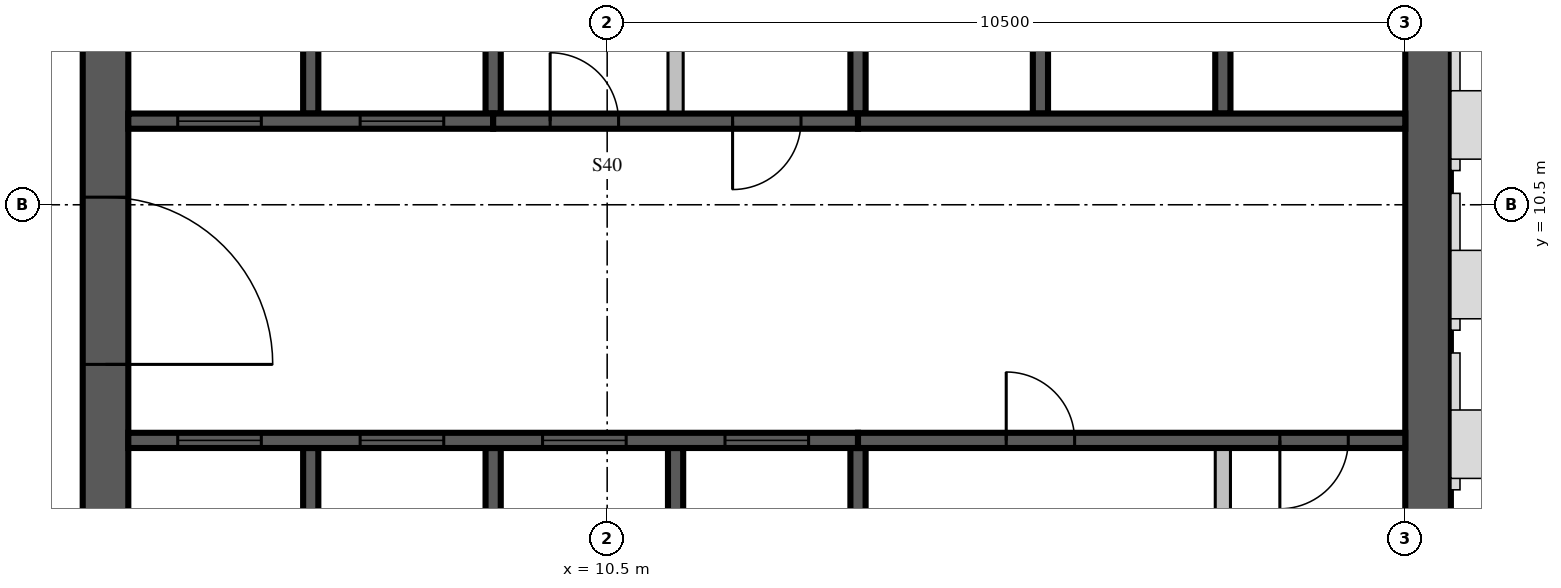
"""IFC4 building model, lengths in metres.
Left out: names, types, materials, properties, quantities, classifications, styles, units other than length and angle.
Written with IfcOpenShell. Run it as: python <this file> out.ifc"""

import sys

from ifc_helpers import new_model, si_unit, direction, frame, frame_2d, origin, place, context, subcontext, project, spatial, rectangle, extrude, source, transform, mapped, element, fill, save


model = new_model("IFC4")
c1 = context("Model", 3, precision=1e-05, world=origin(), true_north=direction((0.0, 1.0)))
c2 = subcontext(c1, "Body", "Model", "MODEL_VIEW")
j1 = project(units=[si_unit("LENGTHUNIT", "METRE"), si_unit("PLANEANGLEUNIT", "RADIAN")], contexts=[c1])
p1 = place(None, origin())
s1 = spatial("IfcSite", under=j1, at=p1, CompositionType="ELEMENT")
p2 = place(p1, origin())
s2 = spatial("IfcBuilding", under=s1, at=p2, CompositionType="ELEMENT")
p3 = place(p2, frame((0.0, 0.0, 337.0)))
s3 = spatial("IfcBuildingStorey", under=s2, at=p3, CompositionType="ELEMENT", Elevation=337.0)
m1 = source(origin(), c2, "Body", "SweptSolid", [
    extrude(rectangle(XDim=17.4, YDim=0.6, at=frame_2d((8.7, 0.0))), origin(), (0.0, 0.0, 1.0), 3.5),
])
p4 = place(p3, frame((3.9, 4.2, 0.0), z_axis=(0.0, 0.0, 1.0), x_axis=(0.0, 1.0, 0.0)))
e1 = element("IfcWall", 1, at=p4, inside=s3, PredefinedType="SHEAR", context=c2, shape_type="MappedRepresentation", body=[
    mapped(m1, transform((0.0, 0.0, 0.0), scale=1.0)),
])
m2 = source(origin(), c2, "Body", "SweptSolid", [
    extrude(rectangle(XDim=2.2, YDim=2.1, at=frame_2d((1.1, 1.05))), frame((0.0, 0.31, 0.0), z_axis=(0.0, -1.0, 0.0), x_axis=(1.0, 0.0, 0.0)), (0.0, 0.0, 1.0), 0.62),
])
p5 = place(p4, frame((4.2, 0.0, 0.0)))
e2 = element("IfcOpeningElement", 2, at=p5, cuts=e1, PredefinedType="OPENING", context=c2, shape_type="MappedRepresentation", body=[
    mapped(m2, transform((0.0, 0.0, 0.0), scale=1.0)),
])
m3 = source(origin(), c2, "Body", "SweptSolid", [
    extrude(rectangle(XDim=16.8, YDim=0.6, at=frame_2d((8.4, 0.0))), origin(), (0.0, 0.0, 1.0), 3.5),
])
p6 = place(p3, frame((21.3, 4.2, 0.0), z_axis=(0.0, 0.0, 1.0), x_axis=(0.0, 1.0, 0.0)))
e3 = element("IfcWall", 3, at=p6, inside=s3, PredefinedType="SHEAR", context=c2, shape_type="MappedRepresentation", body=[
    mapped(m3, transform((0.0, 0.0, 0.0), scale=1.0)),
])
m4 = source(origin(), c2, "Body", "SweptSolid", [
    extrude(rectangle(XDim=1.2, YDim=2.4, at=frame_2d((0.6, 1.2))), frame((0.0, 0.31, 0.0), z_axis=(0.0, -1.0, 0.0), x_axis=(1.0, 0.0, 0.0)), (0.0, 0.0, 1.0), 0.62),
])
p7 = place(p6, frame((12.0, 0.0, 0.6)))
e4 = element("IfcOpeningElement", 4, at=p7, cuts=e3, PredefinedType="OPENING", context=c2, shape_type="MappedRepresentation", body=[
    mapped(m4, transform((0.0, 0.0, 0.0), scale=1.0)),
])
m5 = source(origin(), c2, "Body", "SweptSolid", [
    extrude(rectangle(XDim=3.1, YDim=0.2, at=frame_2d((1.55, 0.0))), origin(), (0.0, 0.0, 1.0), 3.5),
])
for number, where, z_axis, x_axis in (
    (5, (6.6, 4.2, 0.0), (0.0, 0.0, 1.0), (0.0, 1.0, 0.0)),
    (6, (9.0, 4.2, 0.0), (0.0, 0.0, 1.0), (0.0, 1.0, 0.0)),
    (7, (11.4, 4.2, 0.0), (0.0, 0.0, 1.0), (0.0, 1.0, 0.0)),
):
    element("IfcWall", number, at=place(p3, frame(where, z_axis=z_axis, x_axis=x_axis)), inside=s3, PredefinedType="SOLIDWALL", context=c2, shape_type="MappedRepresentation", body=[
        mapped(m5, transform((0.0, 0.0, 0.0), scale=1.0)),
    ])
m6 = source(origin(), c2, "Body", "SweptSolid", [
    extrude(rectangle(XDim=3.1, YDim=0.2, at=frame_2d((1.55, 0.0))), origin(), (0.0, 0.0, 1.0), 3.1),
])
p8 = place(p3, frame((13.8, 4.2, 0.0), z_axis=(0.0, 0.0, 1.0), x_axis=(0.0, 1.0, 0.0)))
e8 = element("IfcWall", 8, at=p8, inside=s3, PredefinedType="SOLIDWALL", context=c2, shape_type="MappedRepresentation", body=[
    mapped(m6, transform((0.0, 0.0, 0.0), scale=1.0)),
])
m7 = source(origin(), c2, "Body", "SweptSolid", [
    extrude(rectangle(XDim=3.1, YDim=0.2, at=frame_2d((1.55, 0.0))), origin(), (0.0, 0.0, 1.0), 3.1),
])
p9 = place(p3, frame((18.6, 4.2, 0.0), z_axis=(0.0, 0.0, 1.0), x_axis=(0.0, 1.0, 0.0)))
e9 = element("IfcWall", 9, at=p9, inside=s3, PredefinedType="PARTITIONING", context=c2, shape_type="MappedRepresentation", body=[
    mapped(m7, transform((0.0, 0.0, 0.0), scale=1.0)),
])
m8 = source(origin(), c2, "Body", "SweptSolid", [
    extrude(rectangle(XDim=3.0, YDim=0.2, at=frame_2d((1.5, 0.0))), origin(), (0.0, 0.0, 1.0), 3.5),
])
p10 = place(p3, frame((6.6, 11.7, 0.0), z_axis=(0.0, 0.0, 1.0), x_axis=(0.0, 1.0, 0.0)))
e10 = element("IfcWall", 10, at=p10, inside=s3, PredefinedType="SOLIDWALL", context=c2, shape_type="MappedRepresentation", body=[
    mapped(m8, transform((0.0, 0.0, 0.0), scale=1.0)),
])
m9 = source(origin(), c2, "Body", "SweptSolid", [
    extrude(rectangle(XDim=3.0, YDim=0.2, at=frame_2d((1.5, 0.0))), origin(), (0.0, 0.0, 1.0), 3.1),
])
for number, where, z_axis, x_axis in (
    (11, (9.0, 11.7, 0.0), (0.0, 0.0, 1.0), (0.0, 1.0, 0.0)),
    (12, (13.8, 11.7, 0.0), (0.0, 0.0, 1.0), (0.0, 1.0, 0.0)),
):
    element("IfcWall", number, at=place(p3, frame(where, z_axis=z_axis, x_axis=x_axis)), inside=s3, PredefinedType="SOLIDWALL", context=c2, shape_type="MappedRepresentation", body=[
        mapped(m9, transform((0.0, 0.0, 0.0), scale=1.0)),
    ])
for number, where, z_axis, x_axis in (
    (13, (16.2, 11.7, 0.0), (0.0, 0.0, 1.0), (0.0, 1.0, 0.0)),
    (14, (18.6, 11.7, 0.0), (0.0, 0.0, 1.0), (0.0, 1.0, 0.0)),
):
    element("IfcWall", number, at=place(p3, frame(where, z_axis=z_axis, x_axis=x_axis)), inside=s3, PredefinedType="SOLIDWALL", context=c2, shape_type="MappedRepresentation", body=[
        mapped(m8, transform((0.0, 0.0, 0.0), scale=1.0)),
    ])
m10 = source(origin(), c2, "Body", "SweptSolid", [
    extrude(rectangle(XDim=3.0, YDim=0.2, at=frame_2d((1.5, 0.0))), origin(), (0.0, 0.0, 1.0), 3.1),
])
p11 = place(p3, frame((11.4, 11.7, 0.0), z_axis=(0.0, 0.0, 1.0), x_axis=(0.0, 1.0, 0.0)))
e15 = element("IfcWall", 15, at=p11, inside=s3, PredefinedType="PARTITIONING", context=c2, shape_type="MappedRepresentation", body=[
    mapped(m10, transform((0.0, 0.0, 0.0), scale=1.0)),
])
m11 = source(origin(), c2, "Body", "SweptSolid", [
    extrude(rectangle(XDim=9.6, YDim=0.2, at=frame_2d((4.8, 0.0))), origin(), (0.0, 0.0, 1.0), 3.5),
])
p12 = place(p3, frame((4.2, 7.4, 0.0), z_axis=(0.0, 0.0, 1.0), x_axis=(1.0, 0.0, 0.0)))
e16 = element("IfcWall", 16, at=p12, inside=s3, PredefinedType="SOLIDWALL", context=c2, shape_type="MappedRepresentation", body=[
    mapped(m11, transform((0.0, 0.0, 0.0), scale=1.0)),
])
m12 = source(origin(), c2, "Body", "SweptSolid", [
    extrude(rectangle(XDim=1.1, YDim=2.1, at=frame_2d((0.55, 1.05))), frame((0.0, 0.11, 0.0), z_axis=(0.0, -1.0, 0.0), x_axis=(1.0, 0.0, 0.0)), (0.0, 0.0, 1.0), 0.22),
])
p13 = place(p12, frame((0.65, 0.0, 0.0)))
e17 = element("IfcOpeningElement", 17, at=p13, cuts=e16, PredefinedType="OPENING", context=c2, shape_type="MappedRepresentation", body=[
    mapped(m12, transform((0.0, 0.0, 0.0), scale=1.0)),
])
p14 = place(p12, frame((3.05, 0.0, 0.0)))
e18 = element("IfcOpeningElement", 18, at=p14, cuts=e16, PredefinedType="OPENING", context=c2, shape_type="MappedRepresentation", body=[
    mapped(m12, transform((0.0, 0.0, 0.0), scale=1.0)),
])
p15 = place(p12, frame((5.45, 0.0, 0.0)))
e19 = element("IfcOpeningElement", 19, at=p15, cuts=e16, PredefinedType="OPENING", context=c2, shape_type="MappedRepresentation", body=[
    mapped(m12, transform((0.0, 0.0, 0.0), scale=1.0)),
])
p16 = place(p12, frame((7.85, 0.0, 0.0)))
e20 = element("IfcOpeningElement", 20, at=p16, cuts=e16, PredefinedType="OPENING", context=c2, shape_type="MappedRepresentation", body=[
    mapped(m12, transform((0.0, 0.0, 0.0), scale=1.0)),
])
m13 = source(origin(), c2, "Body", "SweptSolid", [
    extrude(rectangle(XDim=7.2, YDim=0.2, at=frame_2d((3.6, 0.0))), origin(), (0.0, 0.0, 1.0), 3.1),
])
p17 = place(p3, frame((13.8, 7.4, 0.0), z_axis=(0.0, 0.0, 1.0), x_axis=(1.0, 0.0, 0.0)))
e21 = element("IfcWall", 21, at=p17, inside=s3, PredefinedType="SOLIDWALL", context=c2, shape_type="MappedRepresentation", body=[
    mapped(m13, transform((0.0, 0.0, 0.0), scale=1.0)),
])
m14 = source(origin(), c2, "Body", "SweptSolid", [
    extrude(rectangle(XDim=0.9, YDim=2.1, at=frame_2d((0.45, 1.05))), frame((0.0, 0.11, 0.0), z_axis=(0.0, -1.0, 0.0), x_axis=(1.0, 0.0, 0.0)), (0.0, 0.0, 1.0), 0.22),
])
p18 = place(p17, frame((1.95, 0.0, 0.0)))
e22 = element("IfcOpeningElement", 22, at=p18, cuts=e21, PredefinedType="OPENING", context=c2, shape_type="MappedRepresentation", body=[
    mapped(m14, transform((0.0, 0.0, 0.0), scale=1.0)),
])
p19 = place(p17, frame((5.55, 0.0, 0.0)))
e23 = element("IfcOpeningElement", 23, at=p19, cuts=e21, PredefinedType="OPENING", context=c2, shape_type="MappedRepresentation", body=[
    mapped(m14, transform((0.0, 0.0, 0.0), scale=1.0)),
])
m15 = source(origin(), c2, "Body", "SweptSolid", [
    extrude(rectangle(XDim=4.8, YDim=0.2, at=frame_2d((2.4, 0.0))), origin(), (0.0, 0.0, 1.0), 3.5),
])
p20 = place(p3, frame((4.2, 11.6, 0.0), z_axis=(0.0, 0.0, 1.0), x_axis=(1.0, 0.0, 0.0)))
e24 = element("IfcWall", 24, at=p20, inside=s3, PredefinedType="SOLIDWALL", context=c2, shape_type="MappedRepresentation", body=[
    mapped(m15, transform((0.0, 0.0, 0.0), scale=1.0)),
])
p21 = place(p20, frame((0.65, 0.0, 0.0)))
e25 = element("IfcOpeningElement", 25, at=p21, cuts=e24, PredefinedType="OPENING", context=c2, shape_type="MappedRepresentation", body=[
    mapped(m12, transform((0.0, 0.0, 0.0), scale=1.0)),
])
p22 = place(p20, frame((3.05, 0.0, 0.0)))
e26 = element("IfcOpeningElement", 26, at=p22, cuts=e24, PredefinedType="OPENING", context=c2, shape_type="MappedRepresentation", body=[
    mapped(m12, transform((0.0, 0.0, 0.0), scale=1.0)),
])
m16 = source(origin(), c2, "Body", "SweptSolid", [
    extrude(rectangle(XDim=4.8, YDim=0.2, at=frame_2d((2.4, 0.0))), origin(), (0.0, 0.0, 1.0), 3.1),
])
p23 = place(p3, frame((9.0, 11.6, 0.0), z_axis=(0.0, 0.0, 1.0), x_axis=(1.0, 0.0, 0.0)))
e27 = element("IfcWall", 27, at=p23, inside=s3, PredefinedType="SOLIDWALL", context=c2, shape_type="MappedRepresentation", body=[
    mapped(m16, transform((0.0, 0.0, 0.0), scale=1.0)),
])
p24 = place(p23, frame((0.75, 0.0, 0.0)))
e28 = element("IfcOpeningElement", 28, at=p24, cuts=e27, PredefinedType="OPENING", context=c2, shape_type="MappedRepresentation", body=[
    mapped(m14, transform((0.0, 0.0, 0.0), scale=1.0)),
])
p25 = place(p23, frame((3.15, 0.0, 0.0)))
e29 = element("IfcOpeningElement", 29, at=p25, cuts=e27, PredefinedType="OPENING", context=c2, shape_type="MappedRepresentation", body=[
    mapped(m14, transform((0.0, 0.0, 0.0), scale=1.0)),
])
m17 = source(origin(), c2, "Body", "SweptSolid", [
    extrude(rectangle(XDim=7.2, YDim=0.2, at=frame_2d((3.6, 0.0))), origin(), (0.0, 0.0, 1.0), 3.5),
])
p26 = place(p3, frame((13.8, 11.6, 0.0), z_axis=(0.0, 0.0, 1.0), x_axis=(1.0, 0.0, 0.0)))
e30 = element("IfcWall", 30, at=p26, inside=s3, PredefinedType="SOLIDWALL", context=c2, shape_type="MappedRepresentation", body=[
    mapped(m17, transform((0.0, 0.0, 0.0), scale=1.0)),
])
m18 = source(origin(), c2, "Body", "SweptSolid", [
    extrude(rectangle(XDim=1.1, YDim=2.1, at=frame_2d((0.55, 1.05))), frame((0.0, 0.025, 0.0), z_axis=(0.0, -1.0, 0.0), x_axis=(1.0, 0.0, 0.0)), (0.0, 0.0, 1.0), 0.05),
])
p27 = place(p13, origin())
e31 = element("IfcDoor", 31, at=p27, inside=s3, OperationType="SLIDING_TO_LEFT", PredefinedType="DOOR", context=c2, shape_type="MappedRepresentation", body=[
    mapped(m18, transform((0.0, 0.0, 0.0), scale=1.0)),
])
fill(e17, e31)
p28 = place(p14, origin())
e32 = element("IfcDoor", 32, at=p28, inside=s3, OperationType="SLIDING_TO_LEFT", PredefinedType="DOOR", context=c2, shape_type="MappedRepresentation", body=[
    mapped(m18, transform((0.0, 0.0, 0.0), scale=1.0)),
])
fill(e18, e32)
p29 = place(p15, origin())
e33 = element("IfcDoor", 33, at=p29, inside=s3, OperationType="SLIDING_TO_LEFT", PredefinedType="DOOR", context=c2, shape_type="MappedRepresentation", body=[
    mapped(m18, transform((0.0, 0.0, 0.0), scale=1.0)),
])
fill(e19, e33)
p30 = place(p16, origin())
e34 = element("IfcDoor", 34, at=p30, inside=s3, OperationType="SLIDING_TO_LEFT", PredefinedType="DOOR", context=c2, shape_type="MappedRepresentation", body=[
    mapped(m18, transform((0.0, 0.0, 0.0), scale=1.0)),
])
fill(e20, e34)
m19 = source(origin(), c2, "Body", "SweptSolid", [
    extrude(rectangle(XDim=0.9, YDim=2.1, at=frame_2d((0.45, 1.05))), frame((0.0, 0.025, 0.0), z_axis=(0.0, -1.0, 0.0), x_axis=(1.0, 0.0, 0.0)), (0.0, 0.0, 1.0), 0.05),
])
p31 = place(p18, origin())
e35 = element("IfcDoor", 35, at=p31, inside=s3, OperationType="SINGLE_SWING_LEFT", PredefinedType="DOOR", context=c2, shape_type="MappedRepresentation", body=[
    mapped(m19, transform((0.0, 0.0, 0.0), scale=1.0)),
])
fill(e22, e35)
p32 = place(p19, origin())
e36 = element("IfcDoor", 36, at=p32, inside=s3, OperationType="SINGLE_SWING_RIGHT", PredefinedType="DOOR", context=c2, shape_type="MappedRepresentation", body=[
    mapped(m19, transform((0.0, 0.0, 0.0), scale=1.0)),
])
fill(e23, e36)
p33 = place(p21, origin())
e37 = element("IfcDoor", 37, at=p33, inside=s3, OperationType="SLIDING_TO_LEFT", PredefinedType="DOOR", context=c2, shape_type="MappedRepresentation", body=[
    mapped(m18, transform((0.0, 0.0, 0.0), scale=1.0)),
])
fill(e25, e37)
p34 = place(p22, origin())
e38 = element("IfcDoor", 38, at=p34, inside=s3, OperationType="SLIDING_TO_LEFT", PredefinedType="DOOR", context=c2, shape_type="MappedRepresentation", body=[
    mapped(m18, transform((0.0, 0.0, 0.0), scale=1.0)),
])
fill(e26, e38)
p35 = place(p24, origin())
e39 = element("IfcDoor", 39, at=p35, inside=s3, OperationType="SINGLE_SWING_LEFT", PredefinedType="DOOR", context=c2, shape_type="MappedRepresentation", body=[
    mapped(m19, transform((0.0, 0.0, 0.0), scale=1.0)),
])
fill(e28, e39)
p36 = place(p25, origin())
e40 = element("IfcDoor", 40, at=p36, inside=s3, OperationType="SINGLE_SWING_RIGHT", PredefinedType="DOOR", context=c2, shape_type="MappedRepresentation", body=[
    mapped(m19, transform((0.0, 0.0, 0.0), scale=1.0)),
])
fill(e29, e40)
m20 = source(origin(), c2, "Body", "SweptSolid", [
    extrude(rectangle(XDim=2.2, YDim=2.1, at=frame_2d((1.1, 1.05))), frame((0.0, 0.025, 0.0), z_axis=(0.0, -1.0, 0.0), x_axis=(1.0, 0.0, 0.0)), (0.0, 0.0, 1.0), 0.05),
])
p37 = place(p5, origin())
e41 = element("IfcDoor", 41, at=p37, inside=s3, OperationType="DOUBLE_DOOR_SINGLE_SWING", PredefinedType="DOOR", context=c2, shape_type="MappedRepresentation", body=[
    mapped(m20, transform((0.0, 0.0, 0.0), scale=1.0)),
])
fill(e2, e41)
save(model, sys.argv[1])
